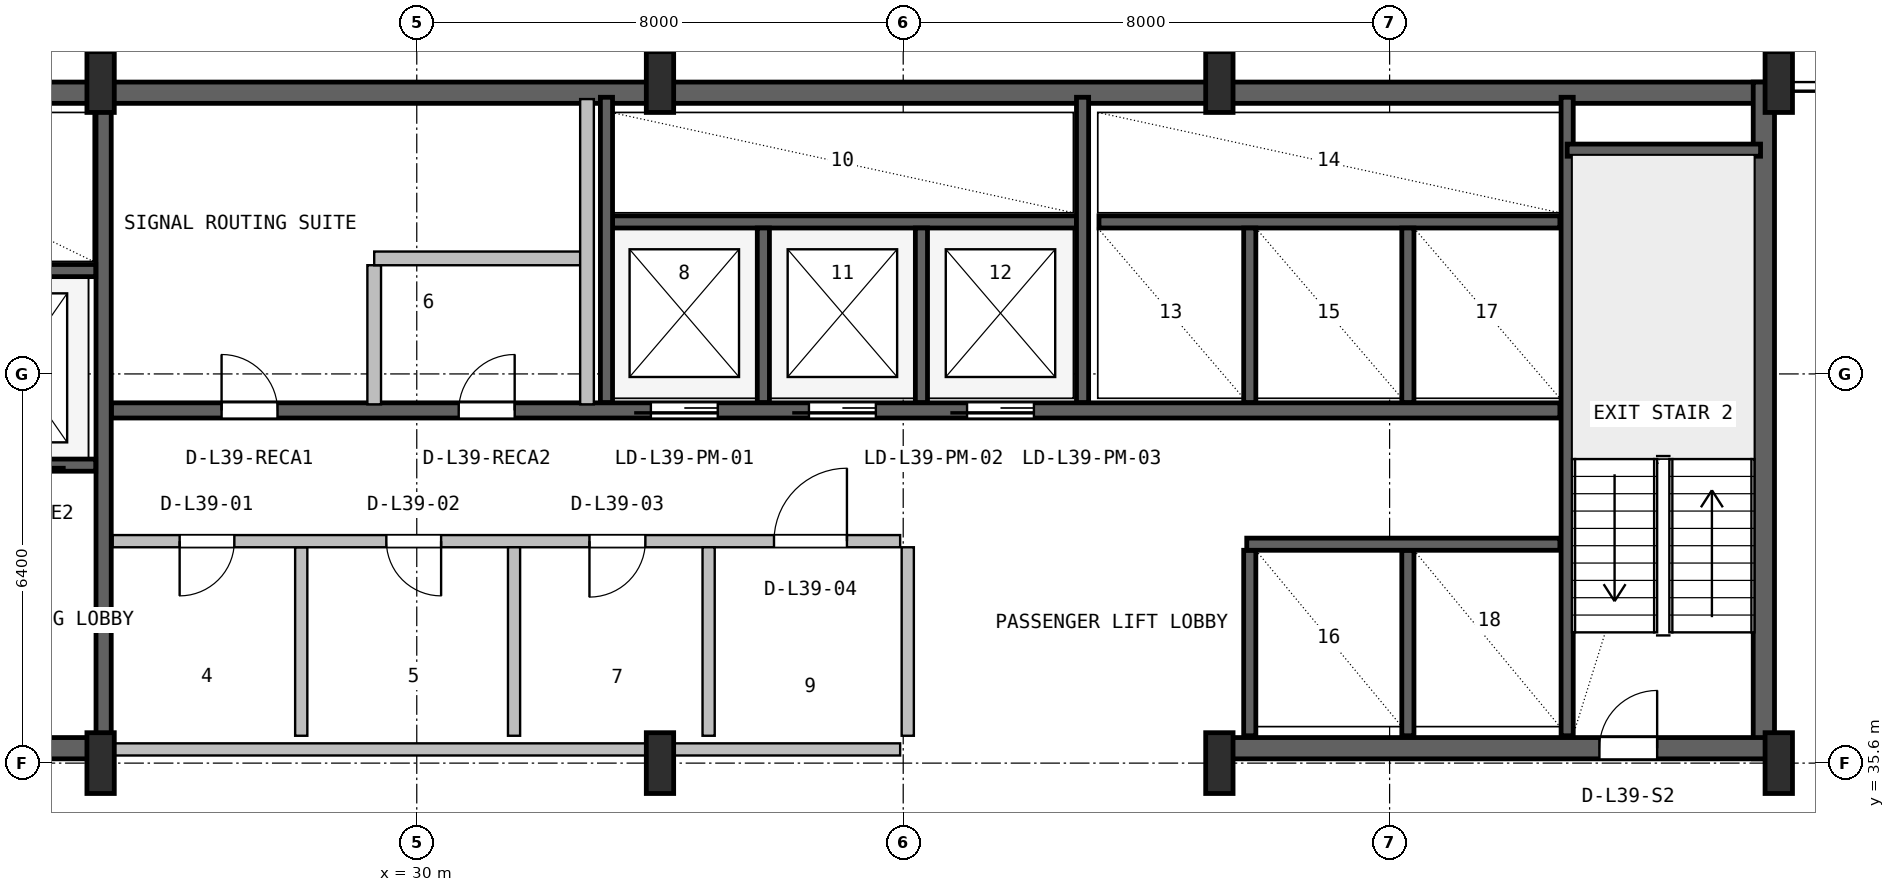
"""IFC4 building model, lengths in metres.
Left out: names, types, materials, properties, quantities, classifications, styles, units other than length and angle.
Written with IfcOpenShell. Run it as: python <this file> out.ifc"""

import sys

from ifc_helpers import new_model, si_unit, direction, frame, frame_2d, origin, origin_2d, place, context, subcontext, project, spatial, rectangle, i_section, extrude, source, transform, mapped, element, fill, save


model = new_model("IFC4")
c1 = context("Model", 3, precision=1e-05, world=origin(), true_north=direction((0.0, 1.0)))
c2 = subcontext(c1, "Body", "Model", "MODEL_VIEW")
j1 = project(units=[si_unit("LENGTHUNIT", "METRE"), si_unit("PLANEANGLEUNIT", "RADIAN")], contexts=[c1])
p1 = place(None, origin())
s1 = spatial("IfcSite", under=j1, at=p1, CompositionType="ELEMENT")
p2 = place(p1, origin())
s2 = spatial("IfcBuilding", under=s1, at=p2, CompositionType="ELEMENT")
p3 = place(p2, frame((0.0, 0.0, 161.0)))
s3 = spatial("IfcBuildingStorey", under=s2, at=p3, CompositionType="ELEMENT", Elevation=161.0)
p4 = place(p3, frame((15.6, 46.625, 0.0), z_axis=(0.0, 0.0, 1.0), x_axis=(1.0, 0.0, 0.0)))
e1 = element("IfcWall", 1, at=p4, inside=s3, PredefinedType="SHEAR", context=c2, shape_type="SweptSolid", body=[
    extrude(rectangle(XDim=36.8, YDim=0.35, at=frame_2d((18.4, 0.0))), origin(), (0.0, 0.0, 1.0), 3.55),
])
p5 = place(p3, frame((52.155, 35.67, 0.0), z_axis=(0.0, 0.0, 1.0), x_axis=(0.0, 1.0, 0.0)))
e2 = element("IfcWall", 2, at=p5, inside=s3, PredefinedType="SHEAR", context=c2, shape_type="SweptSolid", body=[
    extrude(rectangle(XDim=11.13, YDim=0.35, at=frame_2d((5.565, 0.0))), origin(), (0.0, 0.0, 1.0), 3.55),
])
p6 = place(p3, frame((15.67, 35.845, 0.0), z_axis=(0.0, 0.0, 1.0), x_axis=(1.0, 0.0, 0.0)))
e3 = element("IfcWall", 3, at=p6, inside=s3, PredefinedType="SHEAR", context=c2, shape_type="SweptSolid", body=[
    extrude(rectangle(XDim=9.13, YDim=0.35, at=frame_2d((4.565, 0.0))), origin(), (0.0, 0.0, 1.0), 3.55),
])
p7 = place(p6, frame((5.4, 0.0, 0.0)))
e4 = element("IfcOpeningElement", 4, at=p7, cuts=e3, PredefinedType="OPENING", context=c2, shape_type="SweptSolid", body=[
    extrude(rectangle(XDim=1.0, YDim=2.1, at=frame_2d((0.5, 1.05))), frame((0.0, 0.185, 0.0), z_axis=(0.0, -1.0, 0.0), x_axis=(1.0, 0.0, 0.0)), (0.0, 0.0, 1.0), 0.37),
])
p8 = place(p3, frame((43.2, 35.845, 0.0), z_axis=(0.0, 0.0, 1.0), x_axis=(1.0, 0.0, 0.0)))
e5 = element("IfcWall", 5, at=p8, inside=s3, PredefinedType="SHEAR", context=c2, shape_type="SweptSolid", body=[
    extrude(rectangle(XDim=9.13, YDim=0.35, at=frame_2d((4.565, 0.0))), origin(), (0.0, 0.0, 1.0), 3.55),
])
p9 = place(p8, frame((6.25, 0.0, 0.0)))
e6 = element("IfcOpeningElement", 6, at=p9, cuts=e5, PredefinedType="OPENING", context=c2, shape_type="SweptSolid", body=[
    extrude(rectangle(XDim=0.95, YDim=2.1, at=frame_2d((0.475, 1.05))), frame((0.0, 0.185, 0.0), z_axis=(0.0, -1.0, 0.0), x_axis=(1.0, 0.0, 0.0)), (0.0, 0.0, 1.0), 0.37),
])
m1 = source(origin(), c2, "Body", "SweptSolid", [
    extrude(i_section(OverallWidth=0.45, OverallDepth=1.0, WebThickness=0.016, FlangeThickness=0.03, FilletRadius=0.016, at=origin_2d()), origin(), (0.0, 0.0, 1.0), 3.8),
])
for number, where, z_axis, x_axis in (
    (7, (24.8, 35.6, 0.0), (0.0, 0.0, 1.0), (1.0, 0.0, 0.0)),
    (8, (24.8, 46.8, 0.0), (0.0, 0.0, 1.0), (1.0, 0.0, 0.0)),
    (9, (34.0, 35.6, 0.0), (0.0, 0.0, 1.0), (1.0, 0.0, 0.0)),
    (10, (34.0, 46.8, 0.0), (0.0, 0.0, 1.0), (1.0, 0.0, 0.0)),
    (11, (43.2, 35.6, 0.0), (0.0, 0.0, 1.0), (1.0, 0.0, 0.0)),
    (12, (43.2, 46.8, 0.0), (0.0, 0.0, 1.0), (1.0, 0.0, 0.0)),
    (13, (52.4, 35.6, 0.0), (0.0, 0.0, 1.0), (1.0, 0.0, 0.0)),
    (14, (52.4, 46.8, 0.0), (0.0, 0.0, 1.0), (1.0, 0.0, 0.0)),
):
    element("IfcColumn", number, at=place(p3, frame(where, z_axis=z_axis, x_axis=x_axis)), inside=s3, PredefinedType="COLUMN", context=c2, shape_type="MappedRepresentation", body=[
        mapped(m1, transform((0.0, 0.0, 0.0), x_axis=(1.0, 0.0, 0.0), y_axis=(0.0, 1.0, 0.0), z_axis=(0.0, 0.0, 1.0), scale=1.0)),
    ])
p10 = place(p3, frame((24.85, 36.05, 0.0), z_axis=(0.0, 0.0, 1.0), x_axis=(0.0, 1.0, 0.0)))
e15 = element("IfcWall", 15, at=p10, inside=s3, PredefinedType="SHEAR", context=c2, shape_type="SweptSolid", body=[
    extrude(rectangle(XDim=10.45, YDim=0.25, at=frame_2d((5.225, 0.0))), origin(), (0.0, 0.0, 1.0), 3.55),
])
p11 = place(p3, frame((19.2, 40.5, 0.0), z_axis=(0.0, 0.0, 1.0), x_axis=(1.0, 0.0, 0.0)))
e16 = element("IfcWall", 16, at=p11, inside=s3, PredefinedType="SHEAR", context=c2, shape_type="SweptSolid", body=[
    extrude(rectangle(XDim=5.52, YDim=0.2, at=frame_2d((2.76, 0.0))), origin(), (0.0, 0.0, 1.0), 3.55),
])
p12 = place(p11, frame((1.05, 0.0, 0.0)))
e17 = element("IfcOpeningElement", 17, at=p12, cuts=e16, PredefinedType="OPENING", context=c2, shape_type="SweptSolid", body=[
    extrude(rectangle(XDim=1.1, YDim=2.18, at=frame_2d((0.55, 1.09))), frame((0.0, 0.11, 0.0), z_axis=(0.0, -1.0, 0.0), x_axis=(1.0, 0.0, 0.0)), (0.0, 0.0, 1.0), 0.22),
])
p13 = place(p11, frame((3.65, 0.0, 0.0)))
e18 = element("IfcOpeningElement", 18, at=p13, cuts=e16, PredefinedType="OPENING", context=c2, shape_type="SweptSolid", body=[
    extrude(rectangle(XDim=1.1, YDim=2.18, at=frame_2d((0.55, 1.09))), frame((0.0, 0.11, 0.0), z_axis=(0.0, -1.0, 0.0), x_axis=(1.0, 0.0, 0.0)), (0.0, 0.0, 1.0), 0.22),
])
p14 = place(p3, frame((19.2, 43.7, 0.0), z_axis=(0.0, 0.0, 1.0), x_axis=(1.0, 0.0, 0.0)))
e19 = element("IfcWall", 19, at=p14, inside=s3, PredefinedType="SHEAR", context=c2, shape_type="SweptSolid", body=[
    extrude(rectangle(XDim=5.52, YDim=0.2, at=frame_2d((2.76, 0.0))), origin(), (0.0, 0.0, 1.0), 3.55),
])
p15 = place(p3, frame((48.92, 36.05, 0.0), z_axis=(0.0, 0.0, 1.0), x_axis=(0.0, 1.0, 0.0)))
e20 = element("IfcWall", 20, at=p15, inside=s3, PredefinedType="SHEAR", context=c2, shape_type="SweptSolid", body=[
    extrude(rectangle(XDim=10.5, YDim=0.2, at=frame_2d((5.25, 0.0))), origin(), (0.0, 0.0, 1.0), 3.55),
])
p16 = place(p3, frame((48.92, 45.68, 0.0), z_axis=(0.0, 0.0, 1.0), x_axis=(1.0, 0.0, 0.0)))
e21 = element("IfcWall", 21, at=p16, inside=s3, PredefinedType="SHEAR", context=c2, shape_type="SweptSolid", body=[
    extrude(rectangle(XDim=3.18, YDim=0.2, at=frame_2d((1.59, 0.0))), origin(), (0.0, 0.0, 1.0), 3.55),
])
p17 = place(p3, frame((24.98, 41.4, 0.0), z_axis=(0.0, 0.0, 1.0), x_axis=(1.0, 0.0, 0.0)))
e22 = element("IfcWall", 22, at=p17, inside=s3, PredefinedType="SHEAR", context=c2, shape_type="SweptSolid", body=[
    extrude(rectangle(XDim=23.82, YDim=0.25, at=frame_2d((11.91, 0.0))), origin(), (0.0, 0.0, 1.0), 3.55),
])
p18 = place(p17, frame((8.87, 0.0, 0.0)))
e23 = element("IfcOpeningElement", 23, at=p18, cuts=e22, PredefinedType="OPENING", context=c2, shape_type="SweptSolid", body=[
    extrude(rectangle(XDim=1.1, YDim=2.18, at=frame_2d((0.55, 1.09))), frame((0.0, 0.135, 0.0), z_axis=(0.0, -1.0, 0.0), x_axis=(1.0, 0.0, 0.0)), (0.0, 0.0, 1.0), 0.27),
])
p19 = place(p17, frame((11.47, 0.0, 0.0)))
e24 = element("IfcOpeningElement", 24, at=p19, cuts=e22, PredefinedType="OPENING", context=c2, shape_type="SweptSolid", body=[
    extrude(rectangle(XDim=1.1, YDim=2.18, at=frame_2d((0.55, 1.09))), frame((0.0, 0.135, 0.0), z_axis=(0.0, -1.0, 0.0), x_axis=(1.0, 0.0, 0.0)), (0.0, 0.0, 1.0), 0.27),
])
p20 = place(p17, frame((14.07, 0.0, 0.0)))
e25 = element("IfcOpeningElement", 25, at=p20, cuts=e22, PredefinedType="OPENING", context=c2, shape_type="SweptSolid", body=[
    extrude(rectangle(XDim=1.1, YDim=2.18, at=frame_2d((0.55, 1.09))), frame((0.0, 0.135, 0.0), z_axis=(0.0, -1.0, 0.0), x_axis=(1.0, 0.0, 0.0)), (0.0, 0.0, 1.0), 0.27),
])
p21 = place(p17, frame((1.81, 0.0, 0.0)))
e26 = element("IfcOpeningElement", 26, at=p21, cuts=e22, PredefinedType="OPENING", context=c2, shape_type="SweptSolid", body=[
    extrude(rectangle(XDim=0.92, YDim=2.08, at=frame_2d((0.46, 1.04))), frame((0.0, 0.135, 0.0), z_axis=(0.0, -1.0, 0.0), x_axis=(1.0, 0.0, 0.0)), (0.0, 0.0, 1.0), 0.27),
])
p22 = place(p17, frame((5.71, 0.0, 0.0)))
e27 = element("IfcOpeningElement", 27, at=p22, cuts=e22, PredefinedType="OPENING", context=c2, shape_type="SweptSolid", body=[
    extrude(rectangle(XDim=0.92, YDim=2.08, at=frame_2d((0.46, 1.04))), frame((0.0, 0.135, 0.0), z_axis=(0.0, -1.0, 0.0), x_axis=(1.0, 0.0, 0.0)), (0.0, 0.0, 1.0), 0.27),
])
p23 = place(p3, frame((33.22, 44.5, 0.0), z_axis=(0.0, 0.0, 1.0), x_axis=(1.0, 0.0, 0.0)))
e28 = element("IfcWall", 28, at=p23, inside=s3, PredefinedType="SHEAR", context=c2, shape_type="SweptSolid", body=[
    extrude(rectangle(XDim=7.63, YDim=0.2, at=frame_2d((3.815, 0.0))), origin(), (0.0, 0.0, 1.0), 3.55),
])
p24 = place(p3, frame((33.12, 41.53, 0.0), z_axis=(0.0, 0.0, 1.0), x_axis=(0.0, 1.0, 0.0)))
e29 = element("IfcWall", 29, at=p24, inside=s3, PredefinedType="SHEAR", context=c2, shape_type="SweptSolid", body=[
    extrude(rectangle(XDim=5.02, YDim=0.2, at=frame_2d((2.51, 0.0))), origin(), (0.0, 0.0, 1.0), 3.55),
])
for number, where, z_axis, x_axis in (
    (30, (35.7, 41.53, 0.0), (0.0, 0.0, 1.0), (0.0, 1.0, 0.0)),
    (31, (38.3, 41.53, 0.0), (0.0, 0.0, 1.0), (0.0, 1.0, 0.0)),
):
    element("IfcWall", number, at=place(p3, frame(where, z_axis=z_axis, x_axis=x_axis)), inside=s3, PredefinedType="SHEAR", context=c2, shape_type="SweptSolid", body=[
        extrude(rectangle(XDim=2.87, YDim=0.2, at=frame_2d((1.435, 0.0))), origin(), (0.0, 0.0, 1.0), 3.55),
    ])
p25 = place(p3, frame((40.95, 41.53, 0.0), z_axis=(0.0, 0.0, 1.0), x_axis=(0.0, 1.0, 0.0)))
e32 = element("IfcWall", 32, at=p25, inside=s3, PredefinedType="SHEAR", context=c2, shape_type="SweptSolid", body=[
    extrude(rectangle(XDim=5.02, YDim=0.2, at=frame_2d((2.51, 0.0))), origin(), (0.0, 0.0, 1.0), 3.55),
])
p26 = place(p3, frame((41.22, 44.5, 0.0), z_axis=(0.0, 0.0, 1.0), x_axis=(1.0, 0.0, 0.0)))
e33 = element("IfcWall", 33, at=p26, inside=s3, PredefinedType="SHEAR", context=c2, shape_type="SweptSolid", body=[
    extrude(rectangle(XDim=7.58, YDim=0.2, at=frame_2d((3.79, 0.0))), origin(), (0.0, 0.0, 1.0), 3.55),
])
for number, where, z_axis, x_axis in (
    (34, (43.7, 41.53, 0.0), (0.0, 0.0, 1.0), (0.0, 1.0, 0.0)),
    (35, (46.3, 41.53, 0.0), (0.0, 0.0, 1.0), (0.0, 1.0, 0.0)),
):
    element("IfcWall", number, at=place(p3, frame(where, z_axis=z_axis, x_axis=x_axis)), inside=s3, PredefinedType="SHEAR", context=c2, shape_type="SweptSolid", body=[
        extrude(rectangle(XDim=2.87, YDim=0.2, at=frame_2d((1.435, 0.0))), origin(), (0.0, 0.0, 1.0), 3.55),
    ])
for number, where, z_axis, x_axis in (
    (36, (43.7, 36.05, 0.0), (0.0, 0.0, 1.0), (0.0, 1.0, 0.0)),
    (37, (46.3, 36.05, 0.0), (0.0, 0.0, 1.0), (0.0, 1.0, 0.0)),
):
    element("IfcWall", number, at=place(p3, frame(where, z_axis=z_axis, x_axis=x_axis)), inside=s3, PredefinedType="SHEAR", context=c2, shape_type="SweptSolid", body=[
        extrude(rectangle(XDim=3.05, YDim=0.2, at=frame_2d((1.525, 0.0))), origin(), (0.0, 0.0, 1.0), 3.55),
    ])
p27 = place(p3, frame((43.65, 39.2, 0.0), z_axis=(0.0, 0.0, 1.0), x_axis=(1.0, 0.0, 0.0)))
e38 = element("IfcWall", 38, at=p27, inside=s3, PredefinedType="SHEAR", context=c2, shape_type="SweptSolid", body=[
    extrude(rectangle(XDim=5.15, YDim=0.2, at=frame_2d((2.575, 0.0))), origin(), (0.0, 0.0, 1.0), 3.55),
])
p28 = place(p3, frame((25.0, 35.825, 0.0), z_axis=(0.0, 0.0, 1.0), x_axis=(1.0, 0.0, 0.0)))
e39 = element("IfcWall", 39, at=p28, inside=s3, PredefinedType="SOLIDWALL", context=c2, shape_type="SweptSolid", body=[
    extrude(rectangle(XDim=12.95, YDim=0.2, at=frame_2d((6.475, 0.0))), origin(), (0.0, 0.0, 1.0), 2.575),
])
p29 = place(p3, frame((28.1, 36.05, 0.0), z_axis=(0.0, 0.0, 1.0), x_axis=(0.0, 1.0, 0.0)))
e40 = element("IfcWall", 40, at=p29, inside=s3, PredefinedType="PLUMBINGWALL", context=c2, shape_type="SweptSolid", body=[
    extrude(rectangle(XDim=3.1, YDim=0.2, at=frame_2d((1.55, 0.0))), origin(), (0.0, 0.0, 1.0), 3.53),
])
p30 = place(p3, frame((25.0, 39.25, 0.0), z_axis=(0.0, 0.0, 1.0), x_axis=(1.0, 0.0, 0.0)))
e41 = element("IfcWall", 41, at=p30, inside=s3, PredefinedType="SOLIDWALL", context=c2, shape_type="SweptSolid", body=[
    extrude(rectangle(XDim=12.95, YDim=0.2, at=frame_2d((6.475, 0.0))), origin(), (0.0, 0.0, 1.0), 3.53),
])
p31 = place(p30, frame((1.1, 0.0, 0.0)))
e42 = element("IfcOpeningElement", 42, at=p31, cuts=e41, PredefinedType="OPENING", context=c2, shape_type="SweptSolid", body=[
    extrude(rectangle(XDim=0.9, YDim=2.06, at=frame_2d((0.45, 1.03))), frame((0.0, 0.11, 0.0), z_axis=(0.0, -1.0, 0.0), x_axis=(1.0, 0.0, 0.0)), (0.0, 0.0, 1.0), 0.22),
])
p32 = place(p30, frame((4.5, 0.0, 0.0)))
e43 = element("IfcOpeningElement", 43, at=p32, cuts=e41, PredefinedType="OPENING", context=c2, shape_type="SweptSolid", body=[
    extrude(rectangle(XDim=0.9, YDim=2.06, at=frame_2d((0.45, 1.03))), frame((0.0, 0.11, 0.0), z_axis=(0.0, -1.0, 0.0), x_axis=(1.0, 0.0, 0.0)), (0.0, 0.0, 1.0), 0.22),
])
p33 = place(p30, frame((7.84, 0.0, 0.0)))
e44 = element("IfcOpeningElement", 44, at=p33, cuts=e41, PredefinedType="OPENING", context=c2, shape_type="SweptSolid", body=[
    extrude(rectangle(XDim=0.92, YDim=2.08, at=frame_2d((0.46, 1.04))), frame((0.0, 0.11, 0.0), z_axis=(0.0, -1.0, 0.0), x_axis=(1.0, 0.0, 0.0)), (0.0, 0.0, 1.0), 0.22),
])
p34 = place(p30, frame((10.875, 0.0, 0.0)))
e45 = element("IfcOpeningElement", 45, at=p34, cuts=e41, PredefinedType="OPENING", context=c2, shape_type="SweptSolid", body=[
    extrude(rectangle(XDim=1.2, YDim=2.1, at=frame_2d((0.6, 1.05))), frame((0.0, 0.11, 0.0), z_axis=(0.0, -1.0, 0.0), x_axis=(1.0, 0.0, 0.0)), (0.0, 0.0, 1.0), 0.22),
])
p35 = place(p3, frame((31.6, 36.05, 0.0), z_axis=(0.0, 0.0, 1.0), x_axis=(0.0, 1.0, 0.0)))
e46 = element("IfcWall", 46, at=p35, inside=s3, PredefinedType="PLUMBINGWALL", context=c2, shape_type="SweptSolid", body=[
    extrude(rectangle(XDim=3.1, YDim=0.2, at=frame_2d((1.55, 0.0))), origin(), (0.0, 0.0, 1.0), 3.53),
])
for number, where, z_axis, x_axis in (
    (47, (34.8, 36.05, 0.0), (0.0, 0.0, 1.0), (0.0, 1.0, 0.0)),
    (48, (38.075, 36.05, 0.0), (0.0, 0.0, 1.0), (0.0, 1.0, 0.0)),
):
    element("IfcWall", number, at=place(p3, frame(where, z_axis=z_axis, x_axis=x_axis)), inside=s3, PredefinedType="SOLIDWALL", context=c2, shape_type="SweptSolid", body=[
        extrude(rectangle(XDim=3.1, YDim=0.2, at=frame_2d((1.55, 0.0))), origin(), (0.0, 0.0, 1.0), 3.53),
    ])
p36 = place(p3, frame((29.3, 41.5, 0.0), z_axis=(0.0, 0.0, 1.0), x_axis=(0.0, 1.0, 0.0)))
e49 = element("IfcWall", 49, at=p36, inside=s3, PredefinedType="PARTITIONING", context=c2, shape_type="SweptSolid", body=[
    extrude(rectangle(XDim=2.288, YDim=0.225, at=frame_2d((1.144, 0.0))), origin(), (0.0, 0.0, 1.0), 3.53),
])
p37 = place(p3, frame((29.3, 43.9, 0.0), z_axis=(0.0, 0.0, 1.0), x_axis=(1.0, 0.0, 0.0)))
e50 = element("IfcWall", 50, at=p37, inside=s3, PredefinedType="PARTITIONING", context=c2, shape_type="SweptSolid", body=[
    extrude(rectangle(XDim=3.5, YDim=0.225, at=frame_2d((1.75, 0.0))), origin(), (0.0, 0.0, 1.0), 3.53),
])
p38 = place(p3, frame((32.8, 41.5, 0.0), z_axis=(0.0, 0.0, 1.0), x_axis=(0.0, 1.0, 0.0)))
e51 = element("IfcWall", 51, at=p38, inside=s3, PredefinedType="PARTITIONING", context=c2, shape_type="SweptSolid", body=[
    extrude(rectangle(XDim=5.02, YDim=0.225, at=frame_2d((2.51, 0.0))), origin(), (0.0, 0.0, 1.0), 3.53),
])
m2 = source(origin(), c2, "Body", "SweptSolid", [
    extrude(rectangle(XDim=0.95, YDim=2.1, at=frame_2d((0.475, 1.05))), frame((0.0, 0.025, 0.0), z_axis=(0.0, -1.0, 0.0), x_axis=(1.0, 0.0, 0.0)), (0.0, 0.0, 1.0), 0.05),
])
p39 = place(p9, origin())
e52 = element("IfcDoor", 52, at=p39, inside=s3, OperationType="SINGLE_SWING_RIGHT", PredefinedType="DOOR", context=c2, shape_type="MappedRepresentation", body=[
    mapped(m2, transform((0.0, 0.0, 0.0), x_axis=(1.0, 0.0, 0.0), y_axis=(0.0, 1.0, 0.0), z_axis=(0.0, 0.0, 1.0), scale=1.0)),
])
fill(e6, e52)
m3 = source(origin(), c2, "Body", "SweptSolid", [
    extrude(rectangle(XDim=1.1, YDim=2.18, at=frame_2d((0.55, 1.09))), frame((0.0, 0.025, 0.0), z_axis=(0.0, -1.0, 0.0), x_axis=(1.0, 0.0, 0.0)), (0.0, 0.0, 1.0), 0.05),
])
p40 = place(p18, frame((1.1, 0.0, 0.0), z_axis=(0.0, 0.0, 1.0), x_axis=(-1.0, 0.0, 0.0)))
e53 = element("IfcDoor", 53, at=p40, inside=s3, OperationType="SLIDING_TO_LEFT", PredefinedType="DOOR", context=c2, shape_type="MappedRepresentation", body=[
    mapped(m3, transform((0.0, 0.0, 0.0), x_axis=(1.0, 0.0, 0.0), y_axis=(0.0, 1.0, 0.0), z_axis=(0.0, 0.0, 1.0), scale=1.0)),
])
fill(e23, e53)
p41 = place(p19, frame((1.1, 0.0, 0.0), z_axis=(0.0, 0.0, 1.0), x_axis=(-1.0, 0.0, 0.0)))
e54 = element("IfcDoor", 54, at=p41, inside=s3, OperationType="SLIDING_TO_LEFT", PredefinedType="DOOR", context=c2, shape_type="MappedRepresentation", body=[
    mapped(m3, transform((0.0, 0.0, 0.0), x_axis=(1.0, 0.0, 0.0), y_axis=(0.0, 1.0, 0.0), z_axis=(0.0, 0.0, 1.0), scale=1.0)),
])
fill(e24, e54)
p42 = place(p20, frame((1.1, 0.0, 0.0), z_axis=(0.0, 0.0, 1.0), x_axis=(-1.0, 0.0, 0.0)))
e55 = element("IfcDoor", 55, at=p42, inside=s3, OperationType="SLIDING_TO_LEFT", PredefinedType="DOOR", context=c2, shape_type="MappedRepresentation", body=[
    mapped(m3, transform((0.0, 0.0, 0.0), x_axis=(1.0, 0.0, 0.0), y_axis=(0.0, 1.0, 0.0), z_axis=(0.0, 0.0, 1.0), scale=1.0)),
])
fill(e25, e55)
m4 = source(origin(), c2, "Body", "SweptSolid", [
    extrude(rectangle(XDim=0.92, YDim=2.08, at=frame_2d((0.46, 1.04))), frame((0.0, 0.025, 0.0), z_axis=(0.0, -1.0, 0.0), x_axis=(1.0, 0.0, 0.0)), (0.0, 0.0, 1.0), 0.05),
])
p43 = place(p21, origin())
e56 = element("IfcDoor", 56, at=p43, inside=s3, OperationType="SINGLE_SWING_LEFT", PredefinedType="DOOR", context=c2, shape_type="MappedRepresentation", body=[
    mapped(m4, transform((0.0, 0.0, 0.0), x_axis=(1.0, 0.0, 0.0), y_axis=(0.0, 1.0, 0.0), z_axis=(0.0, 0.0, 1.0), scale=1.0)),
])
fill(e26, e56)
p44 = place(p22, origin())
e57 = element("IfcDoor", 57, at=p44, inside=s3, OperationType="SINGLE_SWING_RIGHT", PredefinedType="DOOR", context=c2, shape_type="MappedRepresentation", body=[
    mapped(m4, transform((0.0, 0.0, 0.0), x_axis=(1.0, 0.0, 0.0), y_axis=(0.0, 1.0, 0.0), z_axis=(0.0, 0.0, 1.0), scale=1.0)),
])
fill(e27, e57)
m5 = source(origin(), c2, "Body", "SweptSolid", [
    extrude(rectangle(XDim=0.9, YDim=2.06, at=frame_2d((0.45, 1.03))), frame((0.0, 0.025, 0.0), z_axis=(0.0, -1.0, 0.0), x_axis=(1.0, 0.0, 0.0)), (0.0, 0.0, 1.0), 0.05),
])
p45 = place(p31, frame((0.9, 0.0, 0.0), z_axis=(0.0, 0.0, 1.0), x_axis=(-1.0, 0.0, 0.0)))
e58 = element("IfcDoor", 58, at=p45, inside=s3, OperationType="SINGLE_SWING_LEFT", PredefinedType="DOOR", context=c2, shape_type="MappedRepresentation", body=[
    mapped(m5, transform((0.0, 0.0, 0.0), x_axis=(1.0, 0.0, 0.0), y_axis=(0.0, 1.0, 0.0), z_axis=(0.0, 0.0, 1.0), scale=1.0)),
])
fill(e42, e58)
p46 = place(p32, frame((0.9, 0.0, 0.0), z_axis=(0.0, 0.0, 1.0), x_axis=(-1.0, 0.0, 0.0)))
e59 = element("IfcDoor", 59, at=p46, inside=s3, OperationType="SINGLE_SWING_RIGHT", PredefinedType="DOOR", context=c2, shape_type="MappedRepresentation", body=[
    mapped(m5, transform((0.0, 0.0, 0.0), x_axis=(1.0, 0.0, 0.0), y_axis=(0.0, 1.0, 0.0), z_axis=(0.0, 0.0, 1.0), scale=1.0)),
])
fill(e43, e59)
p47 = place(p33, frame((0.92, 0.0, 0.0), z_axis=(0.0, 0.0, 1.0), x_axis=(-1.0, 0.0, 0.0)))
e60 = element("IfcDoor", 60, at=p47, inside=s3, OperationType="SINGLE_SWING_LEFT", PredefinedType="DOOR", context=c2, shape_type="MappedRepresentation", body=[
    mapped(m4, transform((0.0, 0.0, 0.0), x_axis=(1.0, 0.0, 0.0), y_axis=(0.0, 1.0, 0.0), z_axis=(0.0, 0.0, 1.0), scale=1.0)),
])
fill(e44, e60)
m6 = source(origin(), c2, "Body", "SweptSolid", [
    extrude(rectangle(XDim=1.2, YDim=2.1, at=frame_2d((0.6, 1.05))), frame((0.0, 0.025, 0.0), z_axis=(0.0, -1.0, 0.0), x_axis=(1.0, 0.0, 0.0)), (0.0, 0.0, 1.0), 0.05),
])
p48 = place(p34, origin())
e61 = element("IfcDoor", 61, at=p48, inside=s3, OperationType="SINGLE_SWING_RIGHT", PredefinedType="DOOR", context=c2, shape_type="MappedRepresentation", body=[
    mapped(m6, transform((0.0, 0.0, 0.0), x_axis=(1.0, 0.0, 0.0), y_axis=(0.0, 1.0, 0.0), z_axis=(0.0, 0.0, 1.0), scale=1.0)),
])
fill(e45, e61)
save(model, sys.argv[1])
